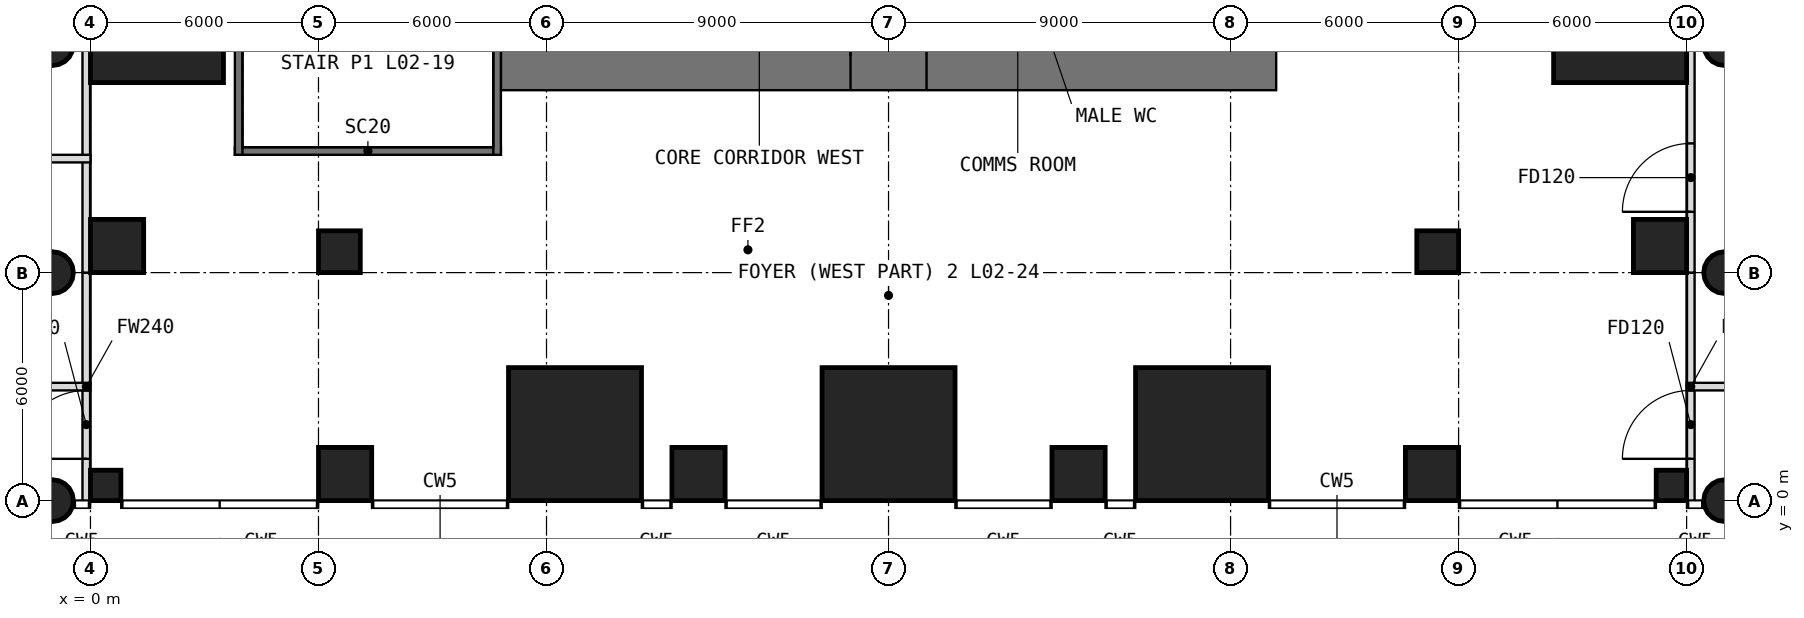
"""IFC4 building model, lengths in metres.
Left out: names, types, materials, properties, quantities, classifications, styles, units other than length and angle.
Written with IfcOpenShell. Run it as: python <this file> out.ifc"""

import sys

from ifc_helpers import new_model, si_unit, direction, frame, frame_2d, origin, origin_2d, place, context, subcontext, project, spatial, rectangle, circle, extrude, element, fill, save


model = new_model("IFC4")
c1 = context("Model", 3, precision=1e-05, world=origin(), true_north=direction((0.0, 1.0)))
c2 = subcontext(c1, "Body", "Model", "MODEL_VIEW")
j1 = project(units=[si_unit("LENGTHUNIT", "METRE"), si_unit("PLANEANGLEUNIT", "RADIAN")], contexts=[c1])
p1 = place(None, origin())
s1 = spatial("IfcSite", under=j1, at=p1, CompositionType="ELEMENT")
p2 = place(p1, origin())
s2 = spatial("IfcBuilding", under=s1, at=p2, CompositionType="ELEMENT")
p3 = place(p2, frame((0.0, 0.0, 11.0)))
s3 = spatial("IfcBuildingStorey", under=s2, at=p3, CompositionType="ELEMENT", Elevation=11.0)
p4 = place(p3, frame((-1.0, 0.0, 0.0), z_axis=(0.0, 0.0, 1.0), x_axis=(1.0, 0.0, 0.0)))
e1 = element("IfcColumn", 1, at=p4, inside=s3, PredefinedType="COLUMN", context=c2, shape_type="SweptSolid", body=[
    extrude(circle(Radius=0.55, at=origin_2d()), origin(), (0.0, 0.0, 1.0), 7.0),
])
p5 = place(p3, frame((0.4, 0.4, 0.0), z_axis=(0.0, 0.0, 1.0), x_axis=(1.0, 0.0, 0.0)))
e2 = element("IfcColumn", 2, at=p5, inside=s3, PredefinedType="COLUMN", context=c2, shape_type="SweptSolid", body=[
    extrude(rectangle(XDim=0.8, YDim=0.8, at=origin_2d()), origin(), (0.0, 0.0, 1.0), 7.0),
])
p6 = place(p3, frame((6.7, 0.7, 0.0), z_axis=(0.0, 0.0, 1.0), x_axis=(1.0, 0.0, 0.0)))
e3 = element("IfcColumn", 3, at=p6, inside=s3, PredefinedType="COLUMN", context=c2, shape_type="SweptSolid", body=[
    extrude(rectangle(XDim=1.4, YDim=1.4, at=origin_2d()), origin(), (0.0, 0.0, 1.0), 7.0),
])
p7 = place(p3, frame((12.75, 1.75, 0.0), z_axis=(0.0, 0.0, 1.0), x_axis=(1.0, 0.0, 0.0)))
e4 = element("IfcColumn", 4, at=p7, inside=s3, PredefinedType="COLUMN", context=c2, shape_type="SweptSolid", body=[
    extrude(rectangle(XDim=3.5, YDim=3.5, at=origin_2d()), origin(), (0.0, 0.0, 1.0), 7.0),
])
p8 = place(p3, frame((16.0, 0.7, 0.0), z_axis=(0.0, 0.0, 1.0), x_axis=(1.0, 0.0, 0.0)))
e5 = element("IfcColumn", 5, at=p8, inside=s3, PredefinedType="COLUMN", context=c2, shape_type="SweptSolid", body=[
    extrude(rectangle(XDim=1.4, YDim=1.4, at=origin_2d()), origin(), (0.0, 0.0, 1.0), 7.0),
])
p9 = place(p3, frame((21.0, 1.75, 0.0), z_axis=(0.0, 0.0, 1.0), x_axis=(1.0, 0.0, 0.0)))
e6 = element("IfcColumn", 6, at=p9, inside=s3, PredefinedType="COLUMN", context=c2, shape_type="SweptSolid", body=[
    extrude(rectangle(XDim=3.5, YDim=3.5, at=origin_2d()), origin(), (0.0, 0.0, 1.0), 7.0),
])
p10 = place(p3, frame((26.0, 0.7, 0.0), z_axis=(0.0, 0.0, 1.0), x_axis=(1.0, 0.0, 0.0)))
e7 = element("IfcColumn", 7, at=p10, inside=s3, PredefinedType="COLUMN", context=c2, shape_type="SweptSolid", body=[
    extrude(rectangle(XDim=1.4, YDim=1.4, at=origin_2d()), origin(), (0.0, 0.0, 1.0), 7.0),
])
p11 = place(p3, frame((29.25, 1.75, 0.0), z_axis=(0.0, 0.0, 1.0), x_axis=(1.0, 0.0, 0.0)))
e8 = element("IfcColumn", 8, at=p11, inside=s3, PredefinedType="COLUMN", context=c2, shape_type="SweptSolid", body=[
    extrude(rectangle(XDim=3.5, YDim=3.5, at=origin_2d()), origin(), (0.0, 0.0, 1.0), 7.0),
])
p12 = place(p3, frame((35.3, 0.7, 0.0), z_axis=(0.0, 0.0, 1.0), x_axis=(1.0, 0.0, 0.0)))
e9 = element("IfcColumn", 9, at=p12, inside=s3, PredefinedType="COLUMN", context=c2, shape_type="SweptSolid", body=[
    extrude(rectangle(XDim=1.4, YDim=1.4, at=origin_2d()), origin(), (0.0, 0.0, 1.0), 7.0),
])
p13 = place(p3, frame((41.6, 0.4, 0.0), z_axis=(0.0, 0.0, 1.0), x_axis=(1.0, 0.0, 0.0)))
e10 = element("IfcColumn", 10, at=p13, inside=s3, PredefinedType="COLUMN", context=c2, shape_type="SweptSolid", body=[
    extrude(rectangle(XDim=0.8, YDim=0.8, at=origin_2d()), origin(), (0.0, 0.0, 1.0), 7.0),
])
for number, where, z_axis, x_axis in (
    (11, (43.0, 0.0, 0.0), (0.0, 0.0, 1.0), (1.0, 0.0, 0.0)),
    (12, (-1.0, 6.0, 0.0), (0.0, 0.0, 1.0), (1.0, 0.0, 0.0)),
):
    element("IfcColumn", number, at=place(p3, frame(where, z_axis=z_axis, x_axis=x_axis)), inside=s3, PredefinedType="COLUMN", context=c2, shape_type="SweptSolid", body=[
        extrude(circle(Radius=0.55, at=origin_2d()), origin(), (0.0, 0.0, 1.0), 7.0),
    ])
p14 = place(p3, frame((0.7, 6.7, 0.0), z_axis=(0.0, 0.0, 1.0), x_axis=(1.0, 0.0, 0.0)))
e13 = element("IfcColumn", 13, at=p14, inside=s3, PredefinedType="COLUMN", context=c2, shape_type="SweptSolid", body=[
    extrude(rectangle(XDim=1.4, YDim=1.4, at=origin_2d()), origin(), (0.0, 0.0, 1.0), 7.0),
])
for number, where, z_axis, x_axis in (
    (14, (6.55, 6.55, 0.0), (0.0, 0.0, 1.0), (1.0, 0.0, 0.0)),
    (15, (35.45, 6.55, 0.0), (0.0, 0.0, 1.0), (1.0, 0.0, 0.0)),
):
    element("IfcColumn", number, at=place(p3, frame(where, z_axis=z_axis, x_axis=x_axis)), inside=s3, PredefinedType="COLUMN", context=c2, shape_type="SweptSolid", body=[
        extrude(rectangle(XDim=1.1, YDim=1.1, at=origin_2d()), origin(), (0.0, 0.0, 1.0), 7.0),
    ])
p15 = place(p3, frame((41.3, 6.7, 0.0), z_axis=(0.0, 0.0, 1.0), x_axis=(1.0, 0.0, 0.0)))
e16 = element("IfcColumn", 16, at=p15, inside=s3, PredefinedType="COLUMN", context=c2, shape_type="SweptSolid", body=[
    extrude(rectangle(XDim=1.4, YDim=1.4, at=origin_2d()), origin(), (0.0, 0.0, 1.0), 7.0),
])
p16 = place(p3, frame((43.0, 6.0, 0.0), z_axis=(0.0, 0.0, 1.0), x_axis=(1.0, 0.0, 0.0)))
e17 = element("IfcColumn", 17, at=p16, inside=s3, PredefinedType="COLUMN", context=c2, shape_type="SweptSolid", body=[
    extrude(circle(Radius=0.55, at=origin_2d()), origin(), (0.0, 0.0, 1.0), 7.0),
])
for number, where, z_axis, x_axis in (
    (18, (1.75, 12.75, 0.0), (0.0, 0.0, 1.0), (1.0, 0.0, 0.0)),
    (19, (40.25, 12.75, 0.0), (0.0, 0.0, 1.0), (1.0, 0.0, 0.0)),
):
    element("IfcColumn", number, at=place(p3, frame(where, z_axis=z_axis, x_axis=x_axis)), inside=s3, PredefinedType="COLUMN", context=c2, shape_type="SweptSolid", body=[
        extrude(rectangle(XDim=3.5, YDim=3.5, at=origin_2d()), origin(), (0.0, 0.0, 1.0), 7.0),
    ])
p17 = place(p3, frame((-1.0, 12.0, 0.0), z_axis=(0.0, 0.0, 1.0), x_axis=(1.0, 0.0, 0.0)))
e20 = element("IfcColumn", 20, at=p17, inside=s3, PredefinedType="COLUMN", context=c2, shape_type="SweptSolid", body=[
    extrude(circle(Radius=0.55, at=origin_2d()), origin(), (0.0, 0.0, 1.0), 7.0),
])
p18 = place(p3, frame((-1.41, 12.0, 3.556), z_axis=(0.0, 0.0, 1.0), x_axis=(1.0, 0.0, 0.0)))
e21 = element("IfcOpeningElement", 21, at=p18, cuts=e20, PredefinedType="RECESS", context=c2, shape_type="SweptSolid", body=[
    extrude(rectangle(XDim=0.32, YDim=0.474, at=origin_2d()), origin(), (0.0, 0.0, 1.0), 0.719),
])
p19 = place(p3, frame((43.0, 12.0, 0.0), z_axis=(0.0, 0.0, 1.0), x_axis=(1.0, 0.0, 0.0)))
e22 = element("IfcColumn", 22, at=p19, inside=s3, PredefinedType="COLUMN", context=c2, shape_type="SweptSolid", body=[
    extrude(circle(Radius=0.55, at=origin_2d()), origin(), (0.0, 0.0, 1.0), 7.0),
])
p20 = place(p3, frame((10.8, 11.7, -0.3), z_axis=(0.0, 0.0, 1.0), x_axis=(1.0, 0.0, 0.0)))
e23 = element("IfcWall", 23, at=p20, inside=s3, PredefinedType="SHEAR", context=c2, shape_type="SweptSolid", body=[
    extrude(rectangle(XDim=20.4, YDim=1.8, at=frame_2d((10.2, 0.0))), origin(), (0.0, 0.0, 1.0), 7.1),
])
p21 = place(p20, frame((9.2, 0.0, 0.3)))
e24 = element("IfcOpeningElement", 24, at=p21, cuts=e23, PredefinedType="OPENING", context=c2, shape_type="SweptSolid", body=[
    extrude(rectangle(XDim=2.0, YDim=2.2, at=frame_2d((1.0, 1.1))), frame((0.0, 0.91, 0.0), z_axis=(0.0, -1.0, 0.0), x_axis=(1.0, 0.0, 0.0)), (0.0, 0.0, 1.0), 1.82),
])
p22 = place(p3, frame((3.8, 9.2, -0.3), z_axis=(0.0, 0.0, 1.0), x_axis=(1.0, 0.0, 0.0)))
e25 = element("IfcWall", 25, at=p22, inside=s3, PredefinedType="SOLIDWALL", context=c2, shape_type="SweptSolid", body=[
    extrude(rectangle(XDim=7.0, YDim=0.2, at=frame_2d((3.5, 0.0))), origin(), (0.0, 0.0, 1.0), 7.1),
])
for number, where, z_axis, x_axis in (
    (26, (10.7, 9.1, -0.3), (0.0, 0.0, 1.0), (0.0, 1.0, 0.0)),
    (27, (3.9, 21.5, -0.3), (0.0, 0.0, 1.0), (0.0, -1.0, 0.0)),
):
    element("IfcWall", number, at=place(p3, frame(where, z_axis=z_axis, x_axis=x_axis)), inside=s3, PredefinedType="SOLIDWALL", context=c2, shape_type="SweptSolid", body=[
        extrude(rectangle(XDim=12.4, YDim=0.2, at=frame_2d((6.2, 0.0))), origin(), (0.0, 0.0, 1.0), 7.1),
    ])
p23 = place(p3, frame((-0.11, 0.0, 0.0), z_axis=(0.0, 0.0, 1.0), x_axis=(0.0, 1.0, 0.0)))
e28 = element("IfcWall", 28, at=p23, inside=s3, PredefinedType="PARTITIONING", context=c2, shape_type="SweptSolid", body=[
    extrude(rectangle(XDim=6.0, YDim=0.2, at=frame_2d((3.0, 0.0))), origin(), (0.0, 0.0, 1.0), 5.98),
])
p24 = place(p23, frame((1.1, 0.0, 0.0)))
e29 = element("IfcOpeningElement", 29, at=p24, cuts=e28, PredefinedType="OPENING", context=c2, shape_type="SweptSolid", body=[
    extrude(rectangle(XDim=1.8, YDim=2.4, at=frame_2d((0.9, 1.2))), frame((0.0, 0.11, 0.0), z_axis=(0.0, -1.0, 0.0), x_axis=(1.0, 0.0, 0.0)), (0.0, 0.0, 1.0), 0.22),
])
p25 = place(p3, frame((-0.11, 6.0, 0.0), z_axis=(0.0, 0.0, 1.0), x_axis=(0.0, 1.0, 0.0)))
e30 = element("IfcWall", 30, at=p25, inside=s3, PredefinedType="PARTITIONING", context=c2, shape_type="SweptSolid", body=[
    extrude(rectangle(XDim=30.0, YDim=0.2, at=frame_2d((15.0, 0.0))), origin(), (0.0, 0.0, 1.0), 6.6),
])
p26 = place(p25, frame((17.1, 0.0, 0.0)))
e31 = element("IfcOpeningElement", 31, at=p26, cuts=e30, PredefinedType="OPENING", context=c2, shape_type="SweptSolid", body=[
    extrude(rectangle(XDim=1.8, YDim=2.4, at=frame_2d((0.9, 1.2))), frame((0.0, 0.11, 0.0), z_axis=(0.0, -1.0, 0.0), x_axis=(1.0, 0.0, 0.0)), (0.0, 0.0, 1.0), 0.22),
])
p27 = place(p25, frame((26.1, 0.0, 0.0)))
e32 = element("IfcOpeningElement", 32, at=p27, cuts=e30, PredefinedType="OPENING", context=c2, shape_type="SweptSolid", body=[
    extrude(rectangle(XDim=1.8, YDim=2.4, at=frame_2d((0.9, 1.2))), frame((0.0, 0.11, 0.0), z_axis=(0.0, -1.0, 0.0), x_axis=(1.0, 0.0, 0.0)), (0.0, 0.0, 1.0), 0.22),
])
p28 = place(p3, frame((42.11, 0.0, 0.0), z_axis=(0.0, 0.0, 1.0), x_axis=(0.0, 1.0, 0.0)))
e33 = element("IfcWall", 33, at=p28, inside=s3, PredefinedType="PARTITIONING", context=c2, shape_type="SweptSolid", body=[
    extrude(rectangle(XDim=6.0, YDim=0.2, at=frame_2d((3.0, 0.0))), origin(), (0.0, 0.0, 1.0), 5.98),
])
p29 = place(p28, frame((1.1, 0.0, 0.0)))
e34 = element("IfcOpeningElement", 34, at=p29, cuts=e33, PredefinedType="OPENING", context=c2, shape_type="SweptSolid", body=[
    extrude(rectangle(XDim=1.8, YDim=2.4, at=frame_2d((0.9, 1.2))), frame((0.0, 0.11, 0.0), z_axis=(0.0, -1.0, 0.0), x_axis=(1.0, 0.0, 0.0)), (0.0, 0.0, 1.0), 0.22),
])
p30 = place(p3, frame((42.11, 6.0, 0.0), z_axis=(0.0, 0.0, 1.0), x_axis=(0.0, 1.0, 0.0)))
e35 = element("IfcWall", 35, at=p30, inside=s3, PredefinedType="PARTITIONING", context=c2, shape_type="SweptSolid", body=[
    extrude(rectangle(XDim=30.0, YDim=0.2, at=frame_2d((15.0, 0.0))), origin(), (0.0, 0.0, 1.0), 6.6),
])
p31 = place(p30, frame((1.6, 0.0, 0.0)))
e36 = element("IfcOpeningElement", 36, at=p31, cuts=e35, PredefinedType="OPENING", context=c2, shape_type="SweptSolid", body=[
    extrude(rectangle(XDim=1.8, YDim=2.4, at=frame_2d((0.9, 1.2))), frame((0.0, 0.11, 0.0), z_axis=(0.0, -1.0, 0.0), x_axis=(1.0, 0.0, 0.0)), (0.0, 0.0, 1.0), 0.22),
])
p32 = place(p30, frame((17.1, 0.0, 0.0)))
e37 = element("IfcOpeningElement", 37, at=p32, cuts=e35, PredefinedType="OPENING", context=c2, shape_type="SweptSolid", body=[
    extrude(rectangle(XDim=1.8, YDim=2.4, at=frame_2d((0.9, 1.2))), frame((0.0, 0.11, 0.0), z_axis=(0.0, -1.0, 0.0), x_axis=(1.0, 0.0, 0.0)), (0.0, 0.0, 1.0), 0.22),
])
p33 = place(p30, frame((26.1, 0.0, 0.0)))
e38 = element("IfcOpeningElement", 38, at=p33, cuts=e35, PredefinedType="OPENING", context=c2, shape_type="SweptSolid", body=[
    extrude(rectangle(XDim=1.8, YDim=2.4, at=frame_2d((0.9, 1.2))), frame((0.0, 0.11, 0.0), z_axis=(0.0, -1.0, 0.0), x_axis=(1.0, 0.0, 0.0)), (0.0, 0.0, 1.0), 0.22),
])
p34 = place(p3, frame((-13.5, 3.0, 0.0), z_axis=(0.0, 0.0, 1.0), x_axis=(1.0, 0.0, 0.0)))
e39 = element("IfcWall", 39, at=p34, inside=s3, PredefinedType="PARTITIONING", context=c2, shape_type="SweptSolid", body=[
    extrude(rectangle(XDim=13.5, YDim=0.2, at=frame_2d((6.75, 0.0))), origin(), (0.0, 0.0, 1.0), 6.6),
])
p35 = place(p3, frame((-13.5, 9.0, 0.0), z_axis=(0.0, 0.0, 1.0), x_axis=(1.0, 0.0, 0.0)))
e40 = element("IfcWall", 40, at=p35, inside=s3, PredefinedType="PARTITIONING", context=c2, shape_type="SweptSolid", body=[
    extrude(rectangle(XDim=13.5, YDim=0.2, at=frame_2d((6.75, 0.0))), origin(), (0.0, 0.0, 1.0), 6.6),
])
p36 = place(p35, frame((6.25, 0.0, 0.0)))
e41 = element("IfcOpeningElement", 41, at=p36, cuts=e40, PredefinedType="OPENING", context=c2, shape_type="SweptSolid", body=[
    extrude(rectangle(XDim=1.0, YDim=2.2, at=frame_2d((0.5, 1.1))), frame((0.0, 0.11, 0.0), z_axis=(0.0, -1.0, 0.0), x_axis=(1.0, 0.0, 0.0)), (0.0, 0.0, 1.0), 0.22),
])
p37 = place(p3, frame((42.0, 3.0, 0.0), z_axis=(0.0, 0.0, 1.0), x_axis=(1.0, 0.0, 0.0)))
e42 = element("IfcWall", 42, at=p37, inside=s3, PredefinedType="PARTITIONING", context=c2, shape_type="SweptSolid", body=[
    extrude(rectangle(XDim=13.7, YDim=0.2, at=frame_2d((6.85, 0.0))), origin(), (0.0, 0.0, 1.0), 6.6),
])
p38 = place(p21, origin())
e43 = element("IfcDoor", 43, at=p38, inside=s3, OperationType="DOUBLE_DOOR_SINGLE_SWING", PredefinedType="DOOR", context=c2, shape_type="SweptSolid", body=[
    extrude(rectangle(XDim=2.0, YDim=2.2, at=frame_2d((1.0, 1.1))), frame((0.0, 0.025, 0.0), z_axis=(0.0, -1.0, 0.0), x_axis=(1.0, 0.0, 0.0)), (0.0, 0.0, 1.0), 0.05),
])
fill(e24, e43)
p39 = place(p24, origin())
e44 = element("IfcDoor", 44, at=p39, inside=s3, OperationType="DOUBLE_DOOR_SINGLE_SWING", PredefinedType="DOOR", context=c2, shape_type="SweptSolid", body=[
    extrude(rectangle(XDim=1.8, YDim=2.4, at=frame_2d((0.9, 1.2))), frame((0.0, 0.025, 0.0), z_axis=(0.0, -1.0, 0.0), x_axis=(1.0, 0.0, 0.0)), (0.0, 0.0, 1.0), 0.05),
])
fill(e29, e44)
p40 = place(p29, origin())
e45 = element("IfcDoor", 45, at=p40, inside=s3, OperationType="DOUBLE_DOOR_SINGLE_SWING", PredefinedType="DOOR", context=c2, shape_type="SweptSolid", body=[
    extrude(rectangle(XDim=1.8, YDim=2.4, at=frame_2d((0.9, 1.2))), frame((0.0, 0.025, 0.0), z_axis=(0.0, -1.0, 0.0), x_axis=(1.0, 0.0, 0.0)), (0.0, 0.0, 1.0), 0.05),
])
fill(e34, e45)
p41 = place(p31, origin())
e46 = element("IfcDoor", 46, at=p41, inside=s3, OperationType="DOUBLE_DOOR_SINGLE_SWING", PredefinedType="DOOR", context=c2, shape_type="SweptSolid", body=[
    extrude(rectangle(XDim=1.8, YDim=2.4, at=frame_2d((0.9, 1.2))), frame((0.0, 0.025, 0.0), z_axis=(0.0, -1.0, 0.0), x_axis=(1.0, 0.0, 0.0)), (0.0, 0.0, 1.0), 0.05),
])
fill(e36, e46)
save(model, sys.argv[1])
